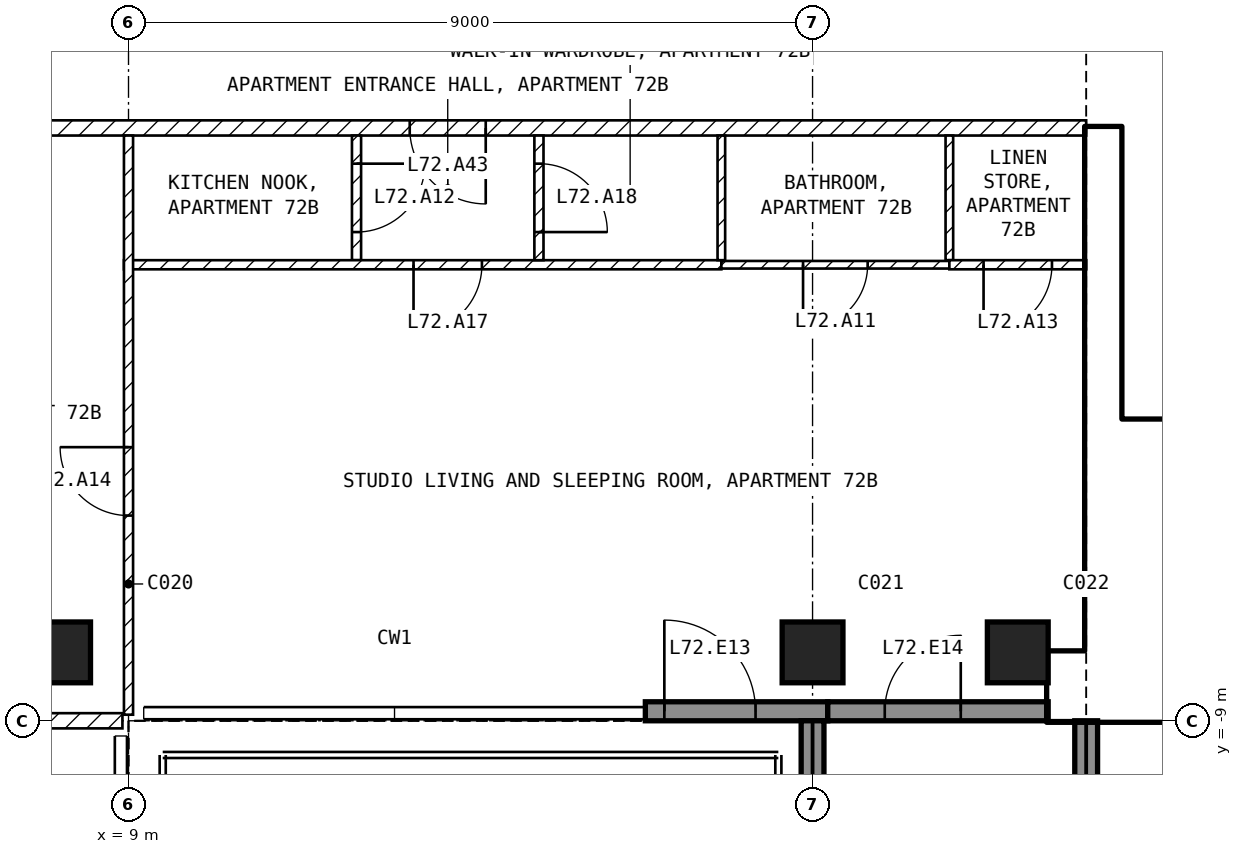
"""IFC4 building model, lengths in metres.
Left out: names, types, materials, properties, quantities, classifications, styles, units other than length and angle.
Written with IfcOpenShell. Run it as: python <this file> out.ifc"""

import sys

from ifc_helpers import new_model, si_unit, direction, frame, frame_2d, origin, origin_2d, place, context, subcontext, project, spatial, rectangle, extrude, element, fill, save


model = new_model("IFC4")
c1 = context("Model", 3, precision=1e-05, world=origin(), true_north=direction((0.0, 1.0)))
c2 = subcontext(c1, "Body", "Model", "MODEL_VIEW")
j1 = project(units=[si_unit("LENGTHUNIT", "METRE"), si_unit("PLANEANGLEUNIT", "RADIAN")], contexts=[c1])
p1 = place(None, origin())
s1 = spatial("IfcSite", under=j1, at=p1, CompositionType="ELEMENT")
p2 = place(p1, origin())
s2 = spatial("IfcBuilding", under=s1, at=p2, CompositionType="ELEMENT")
p3 = place(p2, frame((0.0, 0.0, 281.5)))
s3 = spatial("IfcBuildingStorey", under=s2, at=p3, CompositionType="ELEMENT", Elevation=281.5)
for number, where, z_axis, x_axis in (
    (1, (8.1, -8.1, -0.25), (0.0, 0.0, 1.0), (1.0, 0.0, 0.0)),
    (2, (18.0, -8.1, -0.25), (0.0, 0.0, 1.0), (1.0, 0.0, 0.0)),
    (3, (20.7, -8.1, -0.25), (0.0, 0.0, 1.0), (1.0, 0.0, 0.0)),
):
    element("IfcColumn", number, at=place(p3, frame(where, z_axis=z_axis, x_axis=x_axis)), inside=s3, PredefinedType="COLUMN", context=c2, shape_type="SweptSolid", body=[
        extrude(rectangle(XDim=0.8, YDim=0.8, at=origin_2d()), origin(), (0.0, 0.0, 1.0), 3.45),
    ])
p4 = place(p3, frame((15.8, -8.875, 0.0), z_axis=(0.0, 0.0, 1.0), x_axis=(1.0, 0.0, 0.0)))
e4 = element("IfcWall", 4, at=p4, inside=s3, PredefinedType="SOLIDWALL", context=c2, shape_type="SweptSolid", body=[
    extrude(rectangle(XDim=2.4, YDim=0.25, at=frame_2d((1.2, 0.0))), origin(), (0.0, 0.0, 1.0), 3.2),
])
p5 = place(p4, frame((0.25, 0.0, 0.0)))
e5 = element("IfcOpeningElement", 5, at=p5, cuts=e4, PredefinedType="OPENING", context=c2, shape_type="SweptSolid", body=[
    extrude(rectangle(XDim=1.2, YDim=2.4, at=frame_2d((0.6, 1.2))), frame((0.0, 0.135, 0.0), z_axis=(0.0, -1.0, 0.0), x_axis=(1.0, 0.0, 0.0)), (0.0, 0.0, 1.0), 0.27),
])
p6 = place(p3, frame((18.2, -8.875, 0.0), z_axis=(0.0, 0.0, 1.0), x_axis=(1.0, 0.0, 0.0)))
e6 = element("IfcWall", 6, at=p6, inside=s3, PredefinedType="SOLIDWALL", context=c2, shape_type="SweptSolid", body=[
    extrude(rectangle(XDim=2.9, YDim=0.25, at=frame_2d((1.45, 0.0))), origin(), (0.0, 0.0, 1.0), 3.2),
])
p7 = place(p6, frame((0.75, 0.0, 0.0)))
e7 = element("IfcOpeningElement", 7, at=p7, cuts=e6, PredefinedType="OPENING", context=c2, shape_type="SweptSolid", body=[
    extrude(rectangle(XDim=1.0, YDim=2.4, at=frame_2d((0.5, 1.2))), frame((0.0, 0.135, 0.0), z_axis=(0.0, -1.0, 0.0), x_axis=(1.0, 0.0, 0.0)), (0.0, 0.0, 1.0), 0.27),
])
p8 = place(p3, frame((18.0, -9.0, 0.0), z_axis=(0.0, 0.0, 1.0), x_axis=(0.0, -1.0, 0.0)))
e8 = element("IfcWall", 8, at=p8, inside=s3, PredefinedType="SOLIDWALL", context=c2, shape_type="SweptSolid", body=[
    extrude(rectangle(XDim=2.74, YDim=0.3, at=frame_2d((1.37, 0.0))), origin(), (0.0, 0.0, 1.0), 2.17),
])
p9 = place(p3, frame((21.6, -9.0, 0.0), z_axis=(0.0, 0.0, 1.0), x_axis=(0.0, -1.0, 0.0)))
e9 = element("IfcWall", 9, at=p9, inside=s3, PredefinedType="SOLIDWALL", context=c2, shape_type="SweptSolid", body=[
    extrude(rectangle(XDim=2.7, YDim=0.3, at=frame_2d((1.35, 0.0))), origin(), (0.0, 0.0, 1.0), 3.2),
])
p10 = place(p3, frame((21.1, -8.55, 0.0), z_axis=(0.0, 0.0, 1.0), x_axis=(1.0, 0.0, 0.0)))
e10 = element("IfcWall", 10, at=p10, inside=s3, PredefinedType="SHEAR", context=c2, shape_type="SweptSolid", body=[
    extrude(rectangle(XDim=9.1, YDim=0.9, at=frame_2d((4.55, 0.0))), origin(), (0.0, 0.0, 1.0), 3.2),
])
p11 = place(p3, frame((21.825, -8.1, 0.0), z_axis=(0.0, 0.0, 1.0), x_axis=(0.0, 1.0, 0.0)))
e11 = element("IfcWall", 11, at=p11, inside=s3, PredefinedType="SHEAR", context=c2, shape_type="SweptSolid", body=[
    extrude(rectangle(XDim=6.9, YDim=0.45, at=frame_2d((3.45, 0.0))), origin(), (0.0, 0.0, 1.0), 3.2),
])
p12 = place(p3, frame((22.05, -5.15, 0.0), z_axis=(0.0, 0.0, 1.0), x_axis=(1.0, 0.0, 0.0)))
e12 = element("IfcWall", 12, at=p12, inside=s3, PredefinedType="SOLIDWALL", context=c2, shape_type="SweptSolid", body=[
    extrude(rectangle(XDim=6.3, YDim=0.2, at=frame_2d((3.15, 0.0))), origin(), (0.0, 0.0, 1.0), 3.2),
])
p13 = place(p12, frame((0.2, 0.0, 0.0)))
e13 = element("IfcOpeningElement", 13, at=p13, cuts=e12, PredefinedType="OPENING", context=c2, shape_type="SweptSolid", body=[
    extrude(rectangle(XDim=1.0, YDim=2.1, at=frame_2d((0.5, 1.05))), frame((0.0, 0.11, 0.0), z_axis=(0.0, -1.0, 0.0), x_axis=(1.0, 0.0, 0.0)), (0.0, 0.0, 1.0), 0.22),
])
p14 = place(p3, frame((21.6, -1.2, 0.0), z_axis=(0.0, 0.0, 1.0), x_axis=(-1.0, 0.0, 0.0)))
e14 = element("IfcWall", 14, at=p14, inside=s3, PredefinedType="PARTITIONING", context=c2, shape_type="SweptSolid", body=[
    extrude(rectangle(XDim=17.2, YDim=0.2, at=frame_2d((8.6, 0.0))), origin(), (0.0, 0.0, 1.0), 3.2),
])
p15 = place(p14, frame((7.9, 0.0, 0.0)))
e15 = element("IfcOpeningElement", 15, at=p15, cuts=e14, PredefinedType="OPENING", context=c2, shape_type="SweptSolid", body=[
    extrude(rectangle(XDim=1.0, YDim=2.1, at=frame_2d((0.5, 1.05))), frame((0.0, 0.11, 0.0), z_axis=(0.0, -1.0, 0.0), x_axis=(1.0, 0.0, 0.0)), (0.0, 0.0, 1.0), 0.22),
])
p16 = place(p3, frame((8.92, -9.0, 0.0), z_axis=(0.0, 0.0, 1.0), x_axis=(-1.0, 0.0, 0.0)))
e16 = element("IfcWall", 16, at=p16, inside=s3, PredefinedType="PARTITIONING", context=c2, shape_type="SweptSolid", body=[
    extrude(rectangle(XDim=17.84, YDim=0.2, at=frame_2d((8.92, 0.0))), origin(), (0.0, 0.0, 1.0), 3.2),
])
p17 = place(p16, frame((8.42, 0.0, 0.0)))
e17 = element("IfcOpeningElement", 17, at=p17, cuts=e16, PredefinedType="OPENING", context=c2, shape_type="SweptSolid", body=[
    extrude(rectangle(XDim=1.0, YDim=2.1, at=frame_2d((0.5, 1.05))), frame((0.0, 0.11, 0.0), z_axis=(0.0, -1.0, 0.0), x_axis=(1.0, 0.0, 0.0)), (0.0, 0.0, 1.0), 0.22),
])
p18 = place(p3, frame((12.0, -1.3, 0.0), z_axis=(0.0, 0.0, 1.0), x_axis=(0.0, -1.0, 0.0)))
e18 = element("IfcWall", 18, at=p18, inside=s3, PredefinedType="PARTITIONING", context=c2, shape_type="SweptSolid", body=[
    extrude(rectangle(XDim=1.64, YDim=0.12, at=frame_2d((0.82, 0.0))), origin(), (0.0, 0.0, 1.0), 3.2),
])
p19 = place(p18, frame((0.37, 0.0, 0.0)))
e19 = element("IfcOpeningElement", 19, at=p19, cuts=e18, PredefinedType="OPENING", context=c2, shape_type="SweptSolid", body=[
    extrude(rectangle(XDim=0.9, YDim=2.1, at=frame_2d((0.45, 1.05))), frame((0.0, 0.07, 0.0), z_axis=(0.0, -1.0, 0.0), x_axis=(1.0, 0.0, 0.0)), (0.0, 0.0, 1.0), 0.14),
])
p20 = place(p3, frame((16.8, -3.0, 0.0), z_axis=(0.0, 0.0, 1.0), x_axis=(-1.0, 0.0, 0.0)))
e20 = element("IfcWall", 20, at=p20, inside=s3, PredefinedType="PARTITIONING", context=c2, shape_type="SweptSolid", body=[
    extrude(rectangle(XDim=7.86, YDim=0.12, at=frame_2d((3.93, 0.0))), origin(), (0.0, 0.0, 1.0), 3.2),
])
p21 = place(p20, frame((3.15, 0.0, 0.0)))
e21 = element("IfcOpeningElement", 21, at=p21, cuts=e20, PredefinedType="OPENING", context=c2, shape_type="SweptSolid", body=[
    extrude(rectangle(XDim=0.9, YDim=2.1, at=frame_2d((0.45, 1.05))), frame((0.0, 0.07, 0.0), z_axis=(0.0, -1.0, 0.0), x_axis=(1.0, 0.0, 0.0)), (0.0, 0.0, 1.0), 0.14),
])
p22 = place(p3, frame((9.0, -8.92, 0.0), z_axis=(0.0, 0.0, 1.0), x_axis=(0.0, 1.0, 0.0)))
e22 = element("IfcWall", 22, at=p22, inside=s3, PredefinedType="PARTITIONING", context=c2, shape_type="SweptSolid", body=[
    extrude(rectangle(XDim=7.62, YDim=0.12, at=frame_2d((3.81, 0.0))), origin(), (0.0, 0.0, 1.0), 3.2),
])
p23 = place(p22, frame((2.62, 0.0, 0.0)))
e23 = element("IfcOpeningElement", 23, at=p23, cuts=e22, PredefinedType="OPENING", context=c2, shape_type="SweptSolid", body=[
    extrude(rectangle(XDim=0.9, YDim=2.1, at=frame_2d((0.45, 1.05))), frame((0.0, 0.07, 0.0), z_axis=(0.0, -1.0, 0.0), x_axis=(1.0, 0.0, 0.0)), (0.0, 0.0, 1.0), 0.14),
])
p24 = place(p3, frame((14.4, -1.3, 0.0), z_axis=(0.0, 0.0, 1.0), x_axis=(0.0, -1.0, 0.0)))
e24 = element("IfcWall", 24, at=p24, inside=s3, PredefinedType="PARTITIONING", context=c2, shape_type="SweptSolid", body=[
    extrude(rectangle(XDim=1.64, YDim=0.12, at=frame_2d((0.82, 0.0))), origin(), (0.0, 0.0, 1.0), 3.2),
])
p25 = place(p24, frame((0.37, 0.0, 0.0)))
e25 = element("IfcOpeningElement", 25, at=p25, cuts=e24, PredefinedType="OPENING", context=c2, shape_type="SweptSolid", body=[
    extrude(rectangle(XDim=0.9, YDim=2.1, at=frame_2d((0.45, 1.05))), frame((0.0, 0.07, 0.0), z_axis=(0.0, -1.0, 0.0), x_axis=(1.0, 0.0, 0.0)), (0.0, 0.0, 1.0), 0.14),
])
for number, where, z_axis, x_axis in (
    (26, (16.8, -1.3, 0.0), (0.0, 0.0, 1.0), (0.0, -1.0, 0.0)),
    (27, (19.8, -1.3, 0.0), (0.0, 0.0, 1.0), (0.0, -1.0, 0.0)),
):
    element("IfcWall", number, at=place(p3, frame(where, z_axis=z_axis, x_axis=x_axis)), inside=s3, PredefinedType="PARTITIONING", context=c2, shape_type="SweptSolid", body=[
        extrude(rectangle(XDim=1.64, YDim=0.1, at=frame_2d((0.82, 0.0))), origin(), (0.0, 0.0, 1.0), 3.2),
    ])
p26 = place(p3, frame((19.8, -3.0, 0.0), z_axis=(0.0, 0.0, 1.0), x_axis=(-1.0, 0.0, 0.0)))
e28 = element("IfcWall", 28, at=p26, inside=s3, PredefinedType="PARTITIONING", context=c2, shape_type="SweptSolid", body=[
    extrude(rectangle(XDim=3.0, YDim=0.1, at=frame_2d((1.5, 0.0))), origin(), (0.0, 0.0, 1.0), 3.2),
])
p27 = place(p26, frame((1.075, 0.0, 0.0)))
e29 = element("IfcOpeningElement", 29, at=p27, cuts=e28, PredefinedType="OPENING", context=c2, shape_type="SweptSolid", body=[
    extrude(rectangle(XDim=0.85, YDim=2.1, at=frame_2d((0.425, 1.05))), frame((0.0, 0.06, 0.0), z_axis=(0.0, -1.0, 0.0), x_axis=(1.0, 0.0, 0.0)), (0.0, 0.0, 1.0), 0.12),
])
p28 = place(p3, frame((21.6, -3.0, 0.0), z_axis=(0.0, 0.0, 1.0), x_axis=(-1.0, 0.0, 0.0)))
e30 = element("IfcWall", 30, at=p28, inside=s3, PredefinedType="PARTITIONING", context=c2, shape_type="SweptSolid", body=[
    extrude(rectangle(XDim=1.8, YDim=0.12, at=frame_2d((0.9, 0.0))), origin(), (0.0, 0.0, 1.0), 3.2),
])
p29 = place(p28, frame((0.45, 0.0, 0.0)))
e31 = element("IfcOpeningElement", 31, at=p29, cuts=e30, PredefinedType="OPENING", context=c2, shape_type="SweptSolid", body=[
    extrude(rectangle(XDim=0.9, YDim=2.1, at=frame_2d((0.45, 1.05))), frame((0.0, 0.07, 0.0), z_axis=(0.0, -1.0, 0.0), x_axis=(1.0, 0.0, 0.0)), (0.0, 0.0, 1.0), 0.14),
])
p30 = place(p5, origin())
e32 = element("IfcDoor", 32, at=p30, inside=s3, OperationType="SINGLE_SWING_LEFT", PredefinedType="DOOR", context=c2, shape_type="SweptSolid", body=[
    extrude(rectangle(XDim=1.2, YDim=2.4, at=frame_2d((0.6, 1.2))), frame((0.0, 0.025, 0.0), z_axis=(0.0, -1.0, 0.0), x_axis=(1.0, 0.0, 0.0)), (0.0, 0.0, 1.0), 0.05),
])
fill(e5, e32)
p31 = place(p7, origin())
e33 = element("IfcDoor", 33, at=p31, inside=s3, OperationType="SINGLE_SWING_RIGHT", PredefinedType="DOOR", context=c2, shape_type="SweptSolid", body=[
    extrude(rectangle(XDim=1.0, YDim=2.4, at=frame_2d((0.5, 1.2))), frame((0.0, 0.025, 0.0), z_axis=(0.0, -1.0, 0.0), x_axis=(1.0, 0.0, 0.0)), (0.0, 0.0, 1.0), 0.05),
])
fill(e7, e33)
p32 = place(p13, origin())
e34 = element("IfcDoor", 34, at=p32, inside=s3, OperationType="SINGLE_SWING_LEFT", PredefinedType="DOOR", context=c2, shape_type="SweptSolid", body=[
    extrude(rectangle(XDim=1.0, YDim=2.1, at=frame_2d((0.5, 1.05))), frame((0.0, 0.025, 0.0), z_axis=(0.0, -1.0, 0.0), x_axis=(1.0, 0.0, 0.0)), (0.0, 0.0, 1.0), 0.05),
])
fill(e13, e34)
p33 = place(p27, origin())
e35 = element("IfcDoor", 35, at=p33, inside=s3, OperationType="SINGLE_SWING_RIGHT", PredefinedType="DOOR", context=c2, shape_type="SweptSolid", body=[
    extrude(rectangle(XDim=0.85, YDim=2.1, at=frame_2d((0.425, 1.05))), frame((0.0, 0.025, 0.0), z_axis=(0.0, -1.0, 0.0), x_axis=(1.0, 0.0, 0.0)), (0.0, 0.0, 1.0), 0.05),
])
fill(e29, e35)
p34 = place(p19, origin())
e36 = element("IfcDoor", 36, at=p34, inside=s3, OperationType="SINGLE_SWING_LEFT", PredefinedType="DOOR", context=c2, shape_type="SweptSolid", body=[
    extrude(rectangle(XDim=0.9, YDim=2.1, at=frame_2d((0.45, 1.05))), frame((0.0, 0.025, 0.0), z_axis=(0.0, -1.0, 0.0), x_axis=(1.0, 0.0, 0.0)), (0.0, 0.0, 1.0), 0.05),
])
fill(e19, e36)
p35 = place(p29, origin())
e37 = element("IfcDoor", 37, at=p35, inside=s3, OperationType="SINGLE_SWING_RIGHT", PredefinedType="DOOR", context=c2, shape_type="SweptSolid", body=[
    extrude(rectangle(XDim=0.9, YDim=2.1, at=frame_2d((0.45, 1.05))), frame((0.0, 0.025, 0.0), z_axis=(0.0, -1.0, 0.0), x_axis=(1.0, 0.0, 0.0)), (0.0, 0.0, 1.0), 0.05),
])
fill(e31, e37)
p36 = place(p23, origin())
e38 = element("IfcDoor", 38, at=p36, inside=s3, OperationType="SINGLE_SWING_RIGHT", PredefinedType="DOOR", context=c2, shape_type="SweptSolid", body=[
    extrude(rectangle(XDim=0.9, YDim=2.1, at=frame_2d((0.45, 1.05))), frame((0.0, 0.025, 0.0), z_axis=(0.0, -1.0, 0.0), x_axis=(1.0, 0.0, 0.0)), (0.0, 0.0, 1.0), 0.05),
])
fill(e23, e38)
p37 = place(p21, origin())
e39 = element("IfcDoor", 39, at=p37, inside=s3, OperationType="SINGLE_SWING_RIGHT", PredefinedType="DOOR", context=c2, shape_type="SweptSolid", body=[
    extrude(rectangle(XDim=0.9, YDim=2.1, at=frame_2d((0.45, 1.05))), frame((0.0, 0.025, 0.0), z_axis=(0.0, -1.0, 0.0), x_axis=(1.0, 0.0, 0.0)), (0.0, 0.0, 1.0), 0.05),
])
fill(e21, e39)
p38 = place(p25, origin())
e40 = element("IfcDoor", 40, at=p38, inside=s3, OperationType="SINGLE_SWING_RIGHT", PredefinedType="DOOR", context=c2, shape_type="SweptSolid", body=[
    extrude(rectangle(XDim=0.9, YDim=2.1, at=frame_2d((0.45, 1.05))), frame((0.0, 0.025, 0.0), z_axis=(0.0, -1.0, 0.0), x_axis=(1.0, 0.0, 0.0)), (0.0, 0.0, 1.0), 0.05),
])
fill(e25, e40)
p39 = place(p15, origin())
e41 = element("IfcDoor", 41, at=p39, inside=s3, OperationType="SINGLE_SWING_LEFT", PredefinedType="DOOR", context=c2, shape_type="SweptSolid", body=[
    extrude(rectangle(XDim=1.0, YDim=2.1, at=frame_2d((0.5, 1.05))), frame((0.0, 0.025, 0.0), z_axis=(0.0, -1.0, 0.0), x_axis=(1.0, 0.0, 0.0)), (0.0, 0.0, 1.0), 0.05),
])
fill(e15, e41)
save(model, sys.argv[1])
